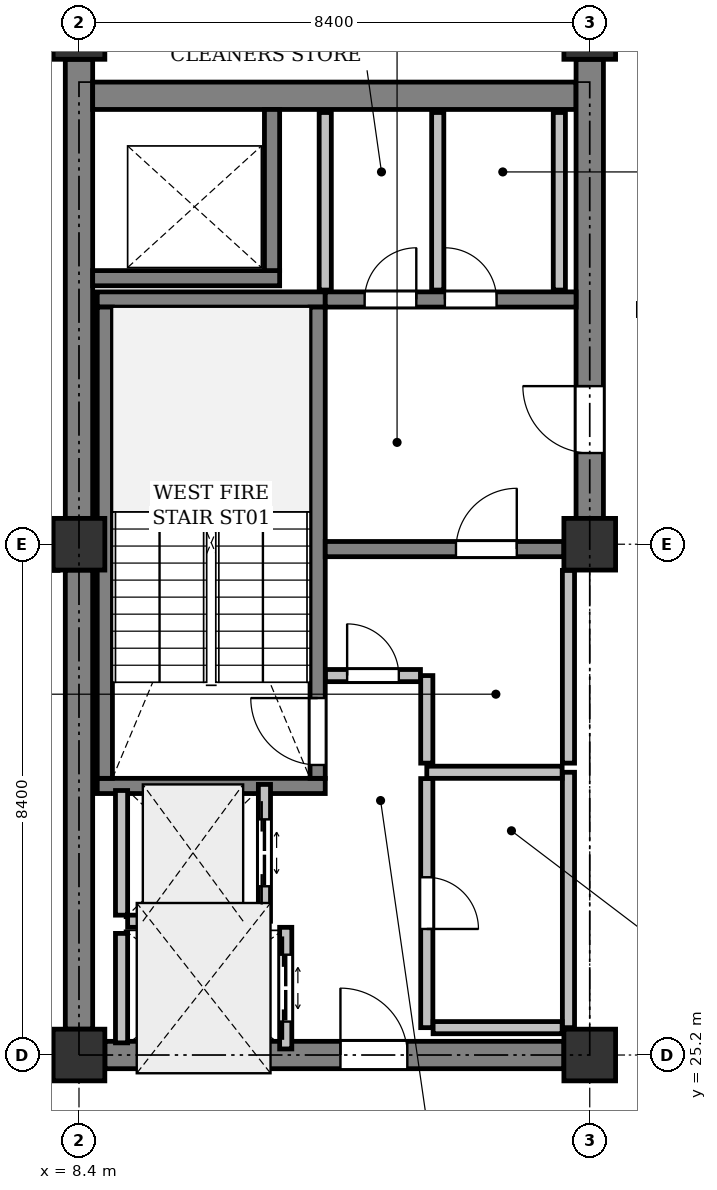
"""IFC4 building model, lengths in metres.
Left out: names, types, materials, properties, quantities, classifications, styles, units other than length and angle.
Written with IfcOpenShell. Run it as: python <this file> out.ifc"""

import sys

from ifc_helpers import new_model, si_unit, direction, frame, frame_2d, origin, origin_2d, place, context, subcontext, project, spatial, rectangle, extrude, element, fill, save


model = new_model("IFC4")
c1 = context("Model", 3, precision=1e-05, world=origin(), true_north=direction((0.0, 1.0)))
c2 = subcontext(c1, "Body", "Model", "MODEL_VIEW")
j1 = project(units=[si_unit("LENGTHUNIT", "METRE"), si_unit("PLANEANGLEUNIT", "RADIAN")], contexts=[c1])
p1 = place(None, origin())
s1 = spatial("IfcSite", under=j1, at=p1, CompositionType="ELEMENT")
p2 = place(p1, origin())
s2 = spatial("IfcBuilding", under=s1, at=p2, CompositionType="ELEMENT")
p3 = place(p2, frame((0.0, 0.0, 250.2)))
s3 = spatial("IfcBuildingStorey", under=s2, at=p3, CompositionType="ELEMENT", Elevation=250.2)
for number, where, z_axis, x_axis in (
    (1, (8.4, 25.2, 0.0), (0.0, 0.0, 1.0), (1.0, 0.0, 0.0)),
    (2, (8.4, 33.6, 0.0), (0.0, 0.0, 1.0), (1.0, 0.0, 0.0)),
    (3, (8.4, 42.0, 0.0), (0.0, 0.0, 1.0), (1.0, 0.0, 0.0)),
    (4, (16.8, 25.2, 0.0), (0.0, 0.0, 1.0), (1.0, 0.0, 0.0)),
    (5, (16.8, 33.6, 0.0), (0.0, 0.0, 1.0), (1.0, 0.0, 0.0)),
    (6, (16.8, 42.0, 0.0), (0.0, 0.0, 1.0), (1.0, 0.0, 0.0)),
):
    element("IfcColumn", number, at=place(p3, frame(where, z_axis=z_axis, x_axis=x_axis)), inside=s3, PredefinedType="COLUMN", context=c2, shape_type="SweptSolid", body=[
        extrude(rectangle(XDim=0.85, YDim=0.85, at=origin_2d()), origin(), (0.0, 0.0, 1.0), 4.0),
    ])
for number, where, z_axis, x_axis in (
    (7, (8.4, 25.625, 0.0), (0.0, 0.0, 1.0), (0.0, 1.0, 0.0)),
    (8, (8.4, 34.025, 0.0), (0.0, 0.0, 1.0), (0.0, 1.0, 0.0)),
):
    element("IfcWall", number, at=place(p3, frame(where, z_axis=z_axis, x_axis=x_axis)), inside=s3, PredefinedType="SHEAR", context=c2, shape_type="SweptSolid", body=[
        extrude(rectangle(XDim=7.55, YDim=0.45, at=frame_2d((3.775, 0.0))), origin(), (0.0, 0.0, 1.0), 3.725),
    ])
p4 = place(p3, frame((8.625, 40.975, 0.0), z_axis=(0.0, 0.0, 1.0), x_axis=(1.0, 0.0, 0.0)))
e9 = element("IfcWall", 9, at=p4, inside=s3, PredefinedType="SHEAR", context=c2, shape_type="SweptSolid", body=[
    extrude(rectangle(XDim=7.95, YDim=0.45, at=frame_2d((3.975, 0.0))), origin(), (0.0, 0.0, 1.0), 3.725),
])
p5 = place(p3, frame((16.8, 34.025, 0.0), z_axis=(0.0, 0.0, 1.0), x_axis=(0.0, 1.0, 0.0)))
e10 = element("IfcWall", 10, at=p5, inside=s3, PredefinedType="SHEAR", context=c2, shape_type="SweptSolid", body=[
    extrude(rectangle(XDim=7.55, YDim=0.45, at=frame_2d((3.775, 0.0))), origin(), (0.0, 0.0, 1.0), 3.725),
])
p6 = place(p5, frame((1.075, 0.0, 0.0)))
e11 = element("IfcOpeningElement", 11, at=p6, cuts=e10, PredefinedType="OPENING", context=c2, shape_type="SweptSolid", body=[
    extrude(rectangle(XDim=1.1, YDim=2.15, at=frame_2d((0.55, 1.075))), frame((0.0, 0.235, 0.0), z_axis=(0.0, -1.0, 0.0), x_axis=(1.0, 0.0, 0.0)), (0.0, 0.0, 1.0), 0.47),
])
p7 = place(p3, frame((8.825, 25.2, 0.0), z_axis=(0.0, 0.0, 1.0), x_axis=(1.0, 0.0, 0.0)))
e12 = element("IfcWall", 12, at=p7, inside=s3, PredefinedType="SHEAR", context=c2, shape_type="SweptSolid", body=[
    extrude(rectangle(XDim=7.55, YDim=0.45, at=frame_2d((3.775, 0.0))), origin(), (0.0, 0.0, 1.0), 3.725),
])
p8 = place(p7, frame((3.875, 0.0, 0.0)))
e13 = element("IfcOpeningElement", 13, at=p8, cuts=e12, PredefinedType="OPENING", context=c2, shape_type="SweptSolid", body=[
    extrude(rectangle(XDim=1.1, YDim=2.15, at=frame_2d((0.55, 1.075))), frame((0.0, 0.235, 0.0), z_axis=(0.0, -1.0, 0.0), x_axis=(1.0, 0.0, 0.0)), (0.0, 0.0, 1.0), 0.47),
])
for number, where, z_axis, x_axis in (
    (14, (12.45, 29.625, 0.0), (0.0, 0.0, 1.0), (-1.0, 0.0, 0.0)),
    (15, (12.45, 37.625, 0.0), (0.0, 0.0, 1.0), (-1.0, 0.0, 0.0)),
):
    element("IfcWall", number, at=place(p3, frame(where, z_axis=z_axis, x_axis=x_axis)), inside=s3, PredefinedType="SHEAR", context=c2, shape_type="SweptSolid", body=[
        extrude(rectangle(XDim=3.75, YDim=0.25, at=frame_2d((1.875, 0.0))), origin(), (0.0, 0.0, 1.0), 3.725),
    ])
p9 = place(p3, frame((12.325, 29.75, 0.0), z_axis=(0.0, 0.0, 1.0), x_axis=(0.0, 1.0, 0.0)))
e16 = element("IfcWall", 16, at=p9, inside=s3, PredefinedType="SHEAR", context=c2, shape_type="SweptSolid", body=[
    extrude(rectangle(XDim=7.75, YDim=0.25, at=frame_2d((3.875, 0.0))), origin(), (0.0, 0.0, 1.0), 3.725),
])
p10 = place(p9, frame((0.22, 0.0, 0.0)))
e17 = element("IfcOpeningElement", 17, at=p10, cuts=e16, PredefinedType="OPENING", context=c2, shape_type="SweptSolid", body=[
    extrude(rectangle(XDim=1.1, YDim=2.15, at=frame_2d((0.55, 1.075))), frame((0.0, 0.135, 0.0), z_axis=(0.0, -1.0, 0.0), x_axis=(1.0, 0.0, 0.0)), (0.0, 0.0, 1.0), 0.27),
])
p11 = place(p3, frame((8.825, 29.75, 0.0), z_axis=(0.0, 0.0, 1.0), x_axis=(0.0, 1.0, 0.0)))
e18 = element("IfcWall", 18, at=p11, inside=s3, PredefinedType="SHEAR", context=c2, shape_type="SweptSolid", body=[
    extrude(rectangle(XDim=7.75, YDim=0.25, at=frame_2d((3.875, 0.0))), origin(), (0.0, 0.0, 1.0), 3.725),
])
p12 = place(p3, frame((8.625, 37.975, 0.0), z_axis=(0.0, 0.0, 1.0), x_axis=(1.0, 0.0, 0.0)))
e19 = element("IfcWall", 19, at=p12, inside=s3, PredefinedType="SHEAR", context=c2, shape_type="SweptSolid", body=[
    extrude(rectangle(XDim=3.075, YDim=0.25, at=frame_2d((1.538, 0.0))), origin(), (0.0, 0.0, 1.0), 3.725),
])
p13 = place(p3, frame((11.575, 38.1, 0.0), z_axis=(0.0, 0.0, 1.0), x_axis=(0.0, 1.0, 0.0)))
e20 = element("IfcWall", 20, at=p13, inside=s3, PredefinedType="SHEAR", context=c2, shape_type="SweptSolid", body=[
    extrude(rectangle(XDim=2.65, YDim=0.25, at=frame_2d((1.325, 0.0))), origin(), (0.0, 0.0, 1.0), 3.725),
])
p14 = place(p3, frame((12.45, 33.52, 0.0), z_axis=(0.0, 0.0, 1.0), x_axis=(1.0, 0.0, 0.0)))
e21 = element("IfcWall", 21, at=p14, inside=s3, PredefinedType="SHEAR", context=c2, shape_type="SweptSolid", body=[
    extrude(rectangle(XDim=3.925, YDim=0.25, at=frame_2d((1.962, 0.0))), origin(), (0.0, 0.0, 1.0), 3.725),
])
p15 = place(p14, frame((2.15, 0.0, 0.0)))
e22 = element("IfcOpeningElement", 22, at=p15, cuts=e21, PredefinedType="OPENING", context=c2, shape_type="SweptSolid", body=[
    extrude(rectangle(XDim=1.0, YDim=2.15, at=frame_2d((0.5, 1.075))), frame((0.0, 0.135, 0.0), z_axis=(0.0, -1.0, 0.0), x_axis=(1.0, 0.0, 0.0)), (0.0, 0.0, 1.0), 0.27),
])
p16 = place(p3, frame((12.45, 37.625, 0.0), z_axis=(0.0, 0.0, 1.0), x_axis=(1.0, 0.0, 0.0)))
e23 = element("IfcWall", 23, at=p16, inside=s3, PredefinedType="SHEAR", context=c2, shape_type="SweptSolid", body=[
    extrude(rectangle(XDim=4.125, YDim=0.25, at=frame_2d((2.062, 0.0))), origin(), (0.0, 0.0, 1.0), 3.725),
])
p17 = place(p16, frame((0.647, 0.0, 0.0)))
e24 = element("IfcOpeningElement", 24, at=p17, cuts=e23, PredefinedType="OPENING", context=c2, shape_type="SweptSolid", body=[
    extrude(rectangle(XDim=0.85, YDim=2.15, at=frame_2d((0.425, 1.075))), frame((0.0, 0.135, 0.0), z_axis=(0.0, -1.0, 0.0), x_axis=(1.0, 0.0, 0.0)), (0.0, 0.0, 1.0), 0.27),
])
p18 = place(p16, frame((1.968, 0.0, 0.0)))
e25 = element("IfcOpeningElement", 25, at=p18, cuts=e23, PredefinedType="OPENING", context=c2, shape_type="SweptSolid", body=[
    extrude(rectangle(XDim=0.85, YDim=2.15, at=frame_2d((0.425, 1.075))), frame((0.0, 0.135, 0.0), z_axis=(0.0, -1.0, 0.0), x_axis=(1.0, 0.0, 0.0)), (0.0, 0.0, 1.0), 0.27),
])
p19 = place(p3, frame((11.45, 27.4, 0.0), z_axis=(0.0, 0.0, 1.0), x_axis=(0.0, 1.0, 0.0)))
e26 = element("IfcWall", 26, at=p19, inside=s3, PredefinedType="PARTITIONING", context=c2, shape_type="SweptSolid", body=[
    extrude(rectangle(XDim=2.25, YDim=0.2, at=frame_2d((1.125, 0.0))), origin(), (0.0, 0.0, 1.0), 3.725),
])
p20 = place(p19, frame((0.575, 0.0, 0.0)))
e27 = element("IfcOpeningElement", 27, at=p20, cuts=e26, PredefinedType="OPENING", context=c2, shape_type="SweptSolid", body=[
    extrude(rectangle(XDim=1.1, YDim=2.2, at=frame_2d((0.55, 1.1))), frame((0.0, 0.11, 0.0), z_axis=(0.0, -1.0, 0.0), x_axis=(1.0, 0.0, 0.0)), (0.0, 0.0, 1.0), 0.22),
])
p21 = place(p3, frame((9.1, 27.5, 0.0), z_axis=(0.0, 0.0, 1.0), x_axis=(0.0, 1.0, 0.0)))
e28 = element("IfcWall", 28, at=p21, inside=s3, PredefinedType="PARTITIONING", context=c2, shape_type="SweptSolid", body=[
    extrude(rectangle(XDim=2.05, YDim=0.2, at=frame_2d((1.025, 0.0))), origin(), (0.0, 0.0, 1.0), 3.725),
])
p22 = place(p3, frame((9.2, 27.4, 0.0), z_axis=(0.0, 0.0, 1.0), x_axis=(1.0, 0.0, 0.0)))
e29 = element("IfcWall", 29, at=p22, inside=s3, PredefinedType="PARTITIONING", context=c2, shape_type="SweptSolid", body=[
    extrude(rectangle(XDim=2.15, YDim=0.2, at=frame_2d((1.075, 0.0))), origin(), (0.0, 0.0, 1.0), 3.725),
])
p23 = place(p3, frame((11.8, 25.3, 0.0), z_axis=(0.0, 0.0, 1.0), x_axis=(0.0, 1.0, 0.0)))
e30 = element("IfcWall", 30, at=p23, inside=s3, PredefinedType="PARTITIONING", context=c2, shape_type="SweptSolid", body=[
    extrude(rectangle(XDim=2.0, YDim=0.2, at=frame_2d((1.0, 0.0))), origin(), (0.0, 0.0, 1.0), 3.725),
])
p24 = place(p23, frame((0.45, 0.0, 0.0)))
e31 = element("IfcOpeningElement", 31, at=p24, cuts=e30, PredefinedType="OPENING", context=c2, shape_type="SweptSolid", body=[
    extrude(rectangle(XDim=1.1, YDim=2.2, at=frame_2d((0.55, 1.1))), frame((0.0, 0.11, 0.0), z_axis=(0.0, -1.0, 0.0), x_axis=(1.0, 0.0, 0.0)), (0.0, 0.0, 1.0), 0.22),
])
p25 = place(p3, frame((9.1, 25.4, 0.0), z_axis=(0.0, 0.0, 1.0), x_axis=(0.0, 1.0, 0.0)))
e32 = element("IfcWall", 32, at=p25, inside=s3, PredefinedType="PARTITIONING", context=c2, shape_type="SweptSolid", body=[
    extrude(rectangle(XDim=1.8, YDim=0.2, at=frame_2d((0.9, 0.0))), origin(), (0.0, 0.0, 1.0), 3.725),
])
p26 = place(p3, frame((16.45, 25.65, 0.0), z_axis=(0.0, 0.0, 1.0), x_axis=(0.0, 1.0, 0.0)))
e33 = element("IfcWall", 33, at=p26, inside=s3, PredefinedType="PARTITIONING", context=c2, shape_type="SweptSolid", body=[
    extrude(rectangle(XDim=4.2, YDim=0.2, at=frame_2d((2.1, 0.0))), origin(), (0.0, 0.0, 1.0), 3.725),
])
p27 = place(p3, frame((16.346, 29.85, 0.0), z_axis=(0.0, 0.0, 1.0), x_axis=(-1.0, 0.0, 0.0)))
e34 = element("IfcWall", 34, at=p27, inside=s3, PredefinedType="PARTITIONING", context=c2, shape_type="SweptSolid", body=[
    extrude(rectangle(XDim=2.226, YDim=0.2, at=frame_2d((1.113, 0.0))), origin(), (0.0, 0.0, 1.0), 3.725),
])
p28 = place(p3, frame((14.12, 29.746, 0.0), z_axis=(0.0, 0.0, 1.0), x_axis=(0.0, -1.0, 0.0)))
e35 = element("IfcWall", 35, at=p28, inside=s3, PredefinedType="PARTITIONING", context=c2, shape_type="SweptSolid", body=[
    extrude(rectangle(XDim=4.096, YDim=0.2, at=frame_2d((2.048, 0.0))), origin(), (0.0, 0.0, 1.0), 3.725),
])
p29 = place(p28, frame((1.623, 0.0, 0.0)))
e36 = element("IfcOpeningElement", 36, at=p29, cuts=e35, PredefinedType="OPENING", context=c2, shape_type="SweptSolid", body=[
    extrude(rectangle(XDim=0.85, YDim=2.15, at=frame_2d((0.425, 1.075))), frame((0.0, 0.11, 0.0), z_axis=(0.0, -1.0, 0.0), x_axis=(1.0, 0.0, 0.0)), (0.0, 0.0, 1.0), 0.22),
])
p30 = place(p3, frame((14.224, 25.65, 0.0), z_axis=(0.0, 0.0, 1.0), x_axis=(1.0, 0.0, 0.0)))
e37 = element("IfcWall", 37, at=p30, inside=s3, PredefinedType="PARTITIONING", context=c2, shape_type="SweptSolid", body=[
    extrude(rectangle(XDim=2.122, YDim=0.2, at=frame_2d((1.061, 0.0))), origin(), (0.0, 0.0, 1.0), 3.725),
])
p31 = place(p3, frame((14.12, 31.44, 0.0), z_axis=(0.0, 0.0, 1.0), x_axis=(0.0, -1.0, 0.0)))
e38 = element("IfcWall", 38, at=p31, inside=s3, PredefinedType="PARTITIONING", context=c2, shape_type="SweptSolid", body=[
    extrude(rectangle(XDim=1.44, YDim=0.2, at=frame_2d((0.72, 0.0))), origin(), (0.0, 0.0, 1.0), 3.725),
])
p32 = place(p3, frame((16.45, 30.0, 0.0), z_axis=(0.0, 0.0, 1.0), x_axis=(0.0, 1.0, 0.0)))
e39 = element("IfcWall", 39, at=p32, inside=s3, PredefinedType="PARTITIONING", context=c2, shape_type="SweptSolid", body=[
    extrude(rectangle(XDim=3.17, YDim=0.2, at=frame_2d((1.585, 0.0))), origin(), (0.0, 0.0, 1.0), 3.725),
])
p33 = place(p3, frame((12.454, 31.44, 0.0), z_axis=(0.0, 0.0, 1.0), x_axis=(1.0, 0.0, 0.0)))
e40 = element("IfcWall", 40, at=p33, inside=s3, PredefinedType="PARTITIONING", context=c2, shape_type="SweptSolid", body=[
    extrude(rectangle(XDim=1.562, YDim=0.2, at=frame_2d((0.781, 0.0))), origin(), (0.0, 0.0, 1.0), 3.725),
])
p34 = place(p33, frame((0.356, 0.0, 0.0)))
e41 = element("IfcOpeningElement", 41, at=p34, cuts=e40, PredefinedType="OPENING", context=c2, shape_type="SweptSolid", body=[
    extrude(rectangle(XDim=0.85, YDim=2.15, at=frame_2d((0.425, 1.075))), frame((0.0, 0.11, 0.0), z_axis=(0.0, -1.0, 0.0), x_axis=(1.0, 0.0, 0.0)), (0.0, 0.0, 1.0), 0.22),
])
for number, where, z_axis, x_axis in (
    (42, (14.3, 37.78, 0.0), (0.0, 0.0, 1.0), (0.0, 1.0, 0.0)),
    (43, (12.45, 40.7, 0.0), (0.0, 0.0, 1.0), (0.0, -1.0, 0.0)),
    (44, (16.3, 37.78, 0.0), (0.0, 0.0, 1.0), (0.0, 1.0, 0.0)),
):
    element("IfcWall", number, at=place(p3, frame(where, z_axis=z_axis, x_axis=x_axis)), inside=s3, PredefinedType="PARTITIONING", context=c2, shape_type="SweptSolid", body=[
        extrude(rectangle(XDim=2.92, YDim=0.2, at=frame_2d((1.46, 0.0))), origin(), (0.0, 0.0, 1.0), 2.775),
    ])
p35 = place(p3, frame((5.4, 25.26, 0.0), z_axis=(0.0, 0.0, 1.0), x_axis=(1.0, 0.0, 0.0)))
e45 = element("IfcWall", 45, at=p35, inside=s3, PredefinedType="PARTITIONING", context=c2, shape_type="SweptSolid", body=[
    extrude(rectangle(XDim=2.555, YDim=0.2, at=frame_2d((1.278, 0.0))), origin(), (0.0, 0.0, 1.0), 3.271),
])
p36 = place(p3, frame((7.956, 33.169, 0.0), z_axis=(0.0, 0.0, 1.0), x_axis=(-0.000855919801, 0.999999633701, 0.0)))
e46 = element("IfcWall", 46, at=p36, inside=s3, PredefinedType="PARTITIONING", context=c2, shape_type="SweptSolid", body=[
    extrude(rectangle(XDim=0.856, YDim=0.2, at=frame_2d((0.428, 0.0))), origin(), (0.0, 0.0, 1.0), 3.271),
])
p37 = place(p6, origin())
e47 = element("IfcDoor", 47, at=p37, inside=s3, OperationType="SINGLE_SWING_RIGHT", PredefinedType="DOOR", context=c2, shape_type="SweptSolid", body=[
    extrude(rectangle(XDim=1.1, YDim=2.15, at=frame_2d((0.55, 1.075))), frame((0.0, 0.025, 0.0), z_axis=(0.0, -1.0, 0.0), x_axis=(1.0, 0.0, 0.0)), (0.0, 0.0, 1.0), 0.05),
])
fill(e11, e47)
p38 = place(p8, origin())
e48 = element("IfcDoor", 48, at=p38, inside=s3, OperationType="SINGLE_SWING_LEFT", PredefinedType="DOOR", context=c2, shape_type="SweptSolid", body=[
    extrude(rectangle(XDim=1.1, YDim=2.15, at=frame_2d((0.55, 1.075))), frame((0.0, 0.025, 0.0), z_axis=(0.0, -1.0, 0.0), x_axis=(1.0, 0.0, 0.0)), (0.0, 0.0, 1.0), 0.05),
])
fill(e13, e48)
p39 = place(p10, origin())
e49 = element("IfcDoor", 49, at=p39, inside=s3, OperationType="SINGLE_SWING_RIGHT", PredefinedType="DOOR", context=c2, shape_type="SweptSolid", body=[
    extrude(rectangle(XDim=1.1, YDim=2.15, at=frame_2d((0.55, 1.075))), frame((0.0, 0.025, 0.0), z_axis=(0.0, -1.0, 0.0), x_axis=(1.0, 0.0, 0.0)), (0.0, 0.0, 1.0), 0.05),
])
fill(e17, e49)
p40 = place(p15, origin())
e50 = element("IfcDoor", 50, at=p40, inside=s3, OperationType="SINGLE_SWING_RIGHT", PredefinedType="DOOR", context=c2, shape_type="SweptSolid", body=[
    extrude(rectangle(XDim=1.0, YDim=2.15, at=frame_2d((0.5, 1.075))), frame((0.0, 0.025, 0.0), z_axis=(0.0, -1.0, 0.0), x_axis=(1.0, 0.0, 0.0)), (0.0, 0.0, 1.0), 0.05),
])
fill(e22, e50)
p41 = place(p20, origin())
e51 = element("IfcDoor", 51, at=p41, inside=s3, OperationType="DOUBLE_DOOR_SLIDING", PredefinedType="DOOR", context=c2, shape_type="SweptSolid", body=[
    extrude(rectangle(XDim=1.1, YDim=2.2, at=frame_2d((0.55, 1.1))), frame((0.0, 0.025, 0.0), z_axis=(0.0, -1.0, 0.0), x_axis=(1.0, 0.0, 0.0)), (0.0, 0.0, 1.0), 0.05),
])
fill(e27, e51)
p42 = place(p24, origin())
e52 = element("IfcDoor", 52, at=p42, inside=s3, OperationType="DOUBLE_DOOR_SLIDING", PredefinedType="DOOR", context=c2, shape_type="SweptSolid", body=[
    extrude(rectangle(XDim=1.1, YDim=2.2, at=frame_2d((0.55, 1.1))), frame((0.0, 0.025, 0.0), z_axis=(0.0, -1.0, 0.0), x_axis=(1.0, 0.0, 0.0)), (0.0, 0.0, 1.0), 0.05),
])
fill(e31, e52)
p43 = place(p29, origin())
e53 = element("IfcDoor", 53, at=p43, inside=s3, OperationType="SINGLE_SWING_RIGHT", PredefinedType="DOOR", context=c2, shape_type="SweptSolid", body=[
    extrude(rectangle(XDim=0.85, YDim=2.15, at=frame_2d((0.425, 1.075))), frame((0.0, 0.025, 0.0), z_axis=(0.0, -1.0, 0.0), x_axis=(1.0, 0.0, 0.0)), (0.0, 0.0, 1.0), 0.05),
])
fill(e36, e53)
p44 = place(p34, origin())
e54 = element("IfcDoor", 54, at=p44, inside=s3, OperationType="SINGLE_SWING_LEFT", PredefinedType="DOOR", context=c2, shape_type="SweptSolid", body=[
    extrude(rectangle(XDim=0.85, YDim=2.15, at=frame_2d((0.425, 1.075))), frame((0.0, 0.025, 0.0), z_axis=(0.0, -1.0, 0.0), x_axis=(1.0, 0.0, 0.0)), (0.0, 0.0, 1.0), 0.05),
])
fill(e41, e54)
p45 = place(p17, origin())
e55 = element("IfcDoor", 55, at=p45, inside=s3, OperationType="SINGLE_SWING_RIGHT", PredefinedType="DOOR", context=c2, shape_type="SweptSolid", body=[
    extrude(rectangle(XDim=0.85, YDim=2.15, at=frame_2d((0.425, 1.075))), frame((0.0, 0.025, 0.0), z_axis=(0.0, -1.0, 0.0), x_axis=(1.0, 0.0, 0.0)), (0.0, 0.0, 1.0), 0.05),
])
fill(e24, e55)
p46 = place(p18, origin())
e56 = element("IfcDoor", 56, at=p46, inside=s3, OperationType="SINGLE_SWING_LEFT", PredefinedType="DOOR", context=c2, shape_type="SweptSolid", body=[
    extrude(rectangle(XDim=0.85, YDim=2.15, at=frame_2d((0.425, 1.075))), frame((0.0, 0.025, 0.0), z_axis=(0.0, -1.0, 0.0), x_axis=(1.0, 0.0, 0.0)), (0.0, 0.0, 1.0), 0.05),
])
fill(e25, e56)
save(model, sys.argv[1])
